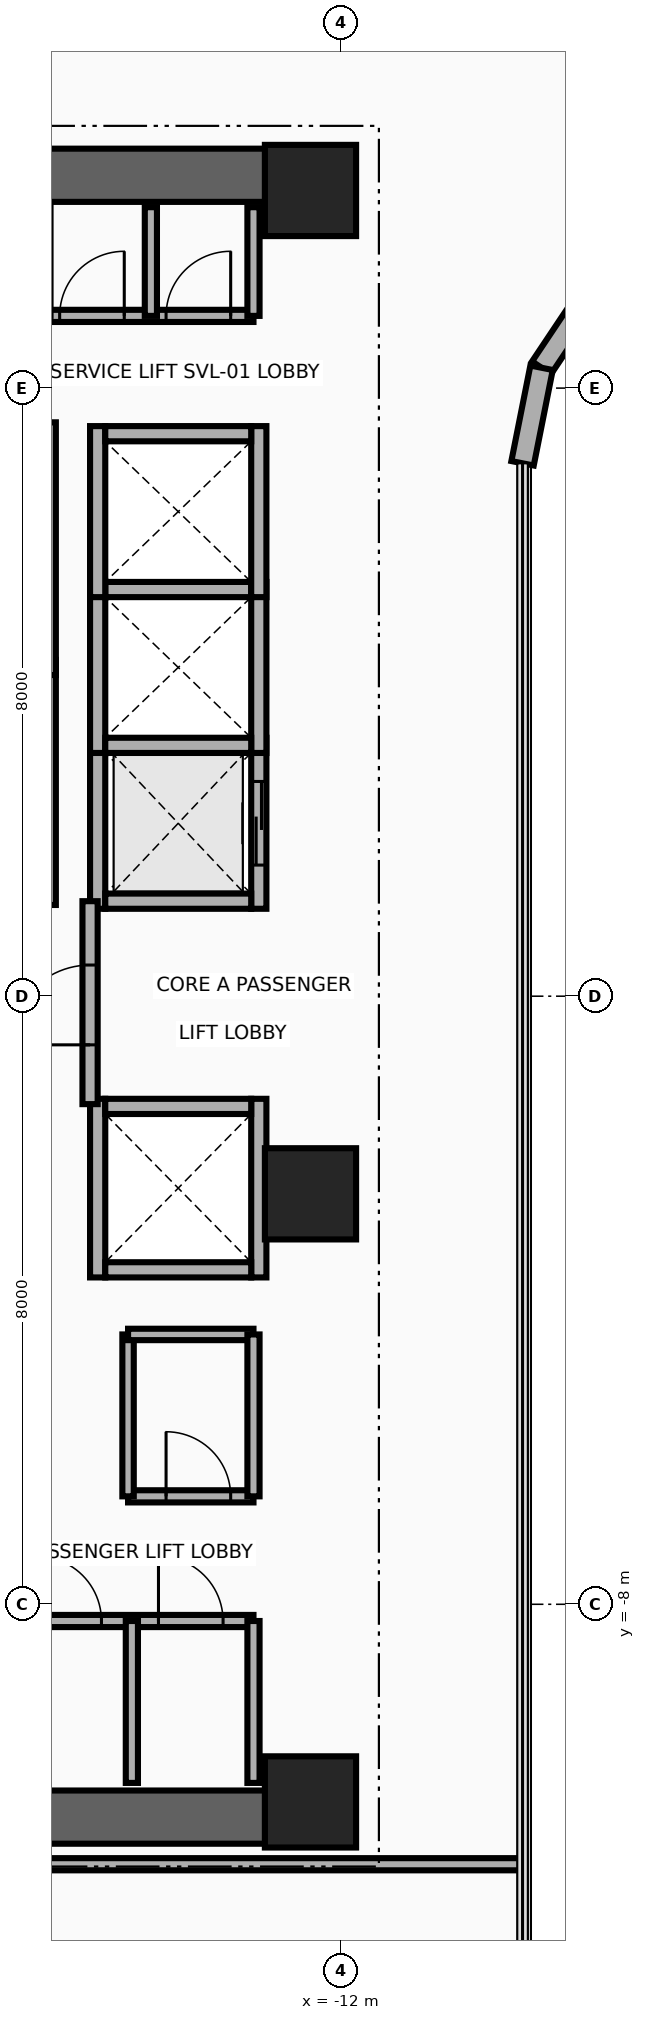
"""IFC4 building model, lengths in metres.
Left out: names, types, materials, properties, quantities, classifications, styles, units other than length and angle.
Written with IfcOpenShell. Run it as: python <this file> out.ifc"""

import sys

from ifc_helpers import new_model, si_unit, direction, frame, frame_2d, origin, origin_2d, place, context, subcontext, project, spatial, rectangle, extrude, source, transform, mapped, element, fill, save


model = new_model("IFC4")
c1 = context("Model", 3, precision=1e-05, world=origin(), true_north=direction((0.0, 1.0)))
c2 = subcontext(c1, "Body", "Model", "MODEL_VIEW")
j1 = project(units=[si_unit("LENGTHUNIT", "METRE"), si_unit("PLANEANGLEUNIT", "RADIAN")], contexts=[c1])
p1 = place(None, origin())
s1 = spatial("IfcSite", under=j1, at=p1, CompositionType="ELEMENT")
p2 = place(p1, origin())
s2 = spatial("IfcBuilding", under=s1, at=p2, CompositionType="ELEMENT")
p3 = place(p2, frame((0.0, 0.0, 139.0)))
s3 = spatial("IfcBuildingStorey", under=s2, at=p3, CompositionType="ELEMENT", Elevation=139.0)
for number, where, z_axis, x_axis in (
    (1, (-22.65, 10.8, 0.0), (0.0, 0.0, 1.0), (1.0, 0.0, 0.0)),
    (2, (-22.65, -10.8, 0.0), (0.0, 0.0, 1.0), (1.0, 0.0, 0.0)),
):
    element("IfcWall", number, at=place(p3, frame(where, z_axis=z_axis, x_axis=x_axis)), inside=s3, PredefinedType="SHEAR", context=c2, shape_type="SweptSolid", body=[
        extrude(rectangle(XDim=10.25, YDim=0.7, at=frame_2d((5.125, 0.0))), origin(), (0.0, 0.0, 1.0), 3.46),
    ])
m1 = source(origin(), c2, "Body", "SweptSolid", [
    extrude(rectangle(XDim=1.2, YDim=1.2, at=origin_2d()), origin(), (0.0, 0.0, 1.0), 3.7),
])
for number, where, z_axis, x_axis in (
    (3, (-12.4, -10.6, 0.0), (0.0, 0.0, 1.0), (1.0, 0.0, 0.0)),
    (4, (-12.4, -2.6, 0.0), (0.0, 0.0, 1.0), (1.0, 0.0, 0.0)),
    (5, (-12.4, 10.6, 0.0), (0.0, 0.0, 1.0), (1.0, 0.0, 0.0)),
):
    element("IfcColumn", number, at=place(p3, frame(where, z_axis=z_axis, x_axis=x_axis)), inside=s3, PredefinedType="COLUMN", context=c2, shape_type="MappedRepresentation", body=[
        mapped(m1, transform((0.0, 0.0, 0.0), x_axis=(1.0, 0.0, 0.0), y_axis=(0.0, 1.0, 0.0), z_axis=(0.0, 0.0, 1.0), scale=1.0)),
    ])
p4 = place(p3, frame((-8.642, 9.342, 0.0), z_axis=(0.0, 0.0, 1.0), x_axis=(-0.555615398575, -0.831439431869, 0.0)))
e6 = element("IfcWall", 6, at=p4, inside=s3, PredefinedType="SOLIDWALL", context=c2, shape_type="SweptSolid", body=[
    extrude(rectangle(XDim=1.292, YDim=0.3, at=frame_2d((0.646, 0.0))), origin(), (0.0, 0.0, 1.0), 3.46),
])
p5 = place(p3, frame((-9.36, 8.268, 0.0), z_axis=(0.0, 0.0, 1.0), x_axis=(-0.195090163074, -0.980785312019, 0.0)))
e7 = element("IfcWall", 7, at=p5, inside=s3, PredefinedType="SOLIDWALL", context=c2, shape_type="SweptSolid", body=[
    extrude(rectangle(XDim=1.281, YDim=0.3, at=frame_2d((0.641, 0.0))), origin(), (0.0, 0.0, 1.0), 3.46),
])
p6 = place(p3, frame((-15.85, 1.2, 0.0), z_axis=(0.0, 0.0, 1.0), x_axis=(0.0, 1.0, 0.0)))
e8 = element("IfcWall", 8, at=p6, inside=s3, PredefinedType="MOVABLE", context=c2, shape_type="SweptSolid", body=[
    extrude(rectangle(XDim=3.225, YDim=0.2, at=frame_2d((1.613, 0.0))), origin(), (0.0, 0.0, 1.0), 3.46),
])
p7 = place(p3, frame((-15.85, 4.225, 0.0), z_axis=(0.0, 0.0, 1.0), x_axis=(0.0, 1.0, 0.0)))
e9 = element("IfcWall", 9, at=p7, inside=s3, PredefinedType="MOVABLE", context=c2, shape_type="SweptSolid", body=[
    extrude(rectangle(XDim=3.325, YDim=0.2, at=frame_2d((1.663, 0.0))), origin(), (0.0, 0.0, 1.0), 3.46),
])
p8 = place(p3, frame((-15.2, 1.15, 0.0), z_axis=(0.0, 0.0, 1.0), x_axis=(0.0, 1.0, 0.0)))
e10 = element("IfcWall", 10, at=p8, inside=s3, PredefinedType="MOVABLE", context=c2, shape_type="SweptSolid", body=[
    extrude(rectangle(XDim=2.25, YDim=0.2, at=frame_2d((1.125, 0.0))), origin(), (0.0, 0.0, 1.0), 3.46),
])
p9 = place(p3, frame((-13.08, 1.15, 0.0), z_axis=(0.0, 0.0, 1.0), x_axis=(0.0, 1.0, 0.0)))
e11 = element("IfcWall", 11, at=p9, inside=s3, PredefinedType="MOVABLE", context=c2, shape_type="SweptSolid", body=[
    extrude(rectangle(XDim=2.25, YDim=0.2, at=frame_2d((1.125, 0.0))), origin(), (0.0, 0.0, 1.0), 3.46),
])
p10 = place(p9, frame((0.575, 0.0, 0.0)))
e12 = element("IfcOpeningElement", 12, at=p10, cuts=e11, PredefinedType="OPENING", context=c2, shape_type="SweptSolid", body=[
    extrude(rectangle(XDim=1.1, YDim=2.1, at=frame_2d((0.55, 1.05))), frame((0.0, 0.115, 0.0), z_axis=(0.0, -1.0, 0.0), x_axis=(1.0, 0.0, 0.0)), (0.0, 0.0, 1.0), 0.23),
])
p11 = place(p3, frame((-15.1, 1.25, 0.0), z_axis=(0.0, 0.0, 1.0), x_axis=(1.0, 0.0, 0.0)))
e13 = element("IfcWall", 13, at=p11, inside=s3, PredefinedType="MOVABLE", context=c2, shape_type="SweptSolid", body=[
    extrude(rectangle(XDim=1.92, YDim=0.2, at=frame_2d((0.96, 0.0))), origin(), (0.0, 0.0, 1.0), 3.46),
])
for number, where, z_axis, x_axis in (
    (14, (-15.2, 3.2, 0.0), (0.0, 0.0, 1.0), (0.0, 1.0, 0.0)),
    (15, (-13.08, 3.2, 0.0), (0.0, 0.0, 1.0), (0.0, 1.0, 0.0)),
):
    element("IfcWall", number, at=place(p3, frame(where, z_axis=z_axis, x_axis=x_axis)), inside=s3, PredefinedType="MOVABLE", context=c2, shape_type="SweptSolid", body=[
        extrude(rectangle(XDim=2.25, YDim=0.2, at=frame_2d((1.125, 0.0))), origin(), (0.0, 0.0, 1.0), 3.46),
    ])
for number, where, z_axis, x_axis in (
    (16, (-15.1, 3.3, 0.0), (0.0, 0.0, 1.0), (1.0, 0.0, 0.0)),
    (17, (-15.1, 5.35, 0.0), (0.0, 0.0, 1.0), (1.0, 0.0, 0.0)),
):
    element("IfcWall", number, at=place(p3, frame(where, z_axis=z_axis, x_axis=x_axis)), inside=s3, PredefinedType="MOVABLE", context=c2, shape_type="SweptSolid", body=[
        extrude(rectangle(XDim=1.92, YDim=0.2, at=frame_2d((0.96, 0.0))), origin(), (0.0, 0.0, 1.0), 3.46),
    ])
for number, where, z_axis, x_axis in (
    (18, (-15.2, 5.25, 0.0), (0.0, 0.0, 1.0), (0.0, 1.0, 0.0)),
    (19, (-13.08, 5.25, 0.0), (0.0, 0.0, 1.0), (0.0, 1.0, 0.0)),
):
    element("IfcWall", number, at=place(p3, frame(where, z_axis=z_axis, x_axis=x_axis)), inside=s3, PredefinedType="MOVABLE", context=c2, shape_type="SweptSolid", body=[
        extrude(rectangle(XDim=2.25, YDim=0.2, at=frame_2d((1.125, 0.0))), origin(), (0.0, 0.0, 1.0), 3.46),
    ])
p12 = place(p3, frame((-15.1, 7.4, 0.0), z_axis=(0.0, 0.0, 1.0), x_axis=(1.0, 0.0, 0.0)))
e20 = element("IfcWall", 20, at=p12, inside=s3, PredefinedType="MOVABLE", context=c2, shape_type="SweptSolid", body=[
    extrude(rectangle(XDim=1.92, YDim=0.2, at=frame_2d((0.96, 0.0))), origin(), (0.0, 0.0, 1.0), 3.46),
])
for number, where, z_axis, x_axis in (
    (21, (-15.2, -3.7, 0.0), (0.0, 0.0, 1.0), (0.0, 1.0, 0.0)),
    (22, (-13.08, -3.7, 0.0), (0.0, 0.0, 1.0), (0.0, 1.0, 0.0)),
):
    element("IfcWall", number, at=place(p3, frame(where, z_axis=z_axis, x_axis=x_axis)), inside=s3, PredefinedType="MOVABLE", context=c2, shape_type="SweptSolid", body=[
        extrude(rectangle(XDim=2.35, YDim=0.2, at=frame_2d((1.175, 0.0))), origin(), (0.0, 0.0, 1.0), 3.46),
    ])
for number, where, z_axis, x_axis in (
    (23, (-15.1, -3.6, 0.0), (0.0, 0.0, 1.0), (1.0, 0.0, 0.0)),
    (24, (-15.1, -1.45, 0.0), (0.0, 0.0, 1.0), (1.0, 0.0, 0.0)),
):
    element("IfcWall", number, at=place(p3, frame(where, z_axis=z_axis, x_axis=x_axis)), inside=s3, PredefinedType="MOVABLE", context=c2, shape_type="SweptSolid", body=[
        extrude(rectangle(XDim=1.92, YDim=0.2, at=frame_2d((0.96, 0.0))), origin(), (0.0, 0.0, 1.0), 3.46),
    ])
p13 = place(p3, frame((-15.3, -1.42, 0.0), z_axis=(0.0, 0.0, 1.0), x_axis=(0.0, 1.0, 0.0)))
e25 = element("IfcWall", 25, at=p13, inside=s3, PredefinedType="PARTITIONING", context=c2, shape_type="SweptSolid", body=[
    extrude(rectangle(XDim=2.67, YDim=0.2, at=frame_2d((1.335, 0.0))), origin(), (0.0, 0.0, 1.0), 3.46),
])
p14 = place(p13, frame((0.78, 0.0, 0.0)))
e26 = element("IfcOpeningElement", 26, at=p14, cuts=e25, PredefinedType="OPENING", context=c2, shape_type="SweptSolid", body=[
    extrude(rectangle(XDim=1.05, YDim=2.15, at=frame_2d((0.525, 1.075))), frame((0.0, 0.115, 0.0), z_axis=(0.0, -1.0, 0.0), x_axis=(1.0, 0.0, 0.0)), (0.0, 0.0, 1.0), 0.23),
])
p15 = place(p3, frame((-18.65, 8.95, 0.0), z_axis=(0.0, 0.0, 1.0), x_axis=(1.0, 0.0, 0.0)))
e27 = element("IfcWall", 27, at=p15, inside=s3, PredefinedType="PARTITIONING", context=c2, shape_type="SweptSolid", body=[
    extrude(rectangle(XDim=5.5, YDim=0.16, at=frame_2d((2.75, 0.0))), origin(), (0.0, 0.0, 1.0), 3.46),
])
p16 = place(p15, frame((0.3, 0.0, 0.0)))
e28 = element("IfcOpeningElement", 28, at=p16, cuts=e27, PredefinedType="OPENING", context=c2, shape_type="SweptSolid", body=[
    extrude(rectangle(XDim=0.85, YDim=2.05, at=frame_2d((0.425, 1.025))), frame((0.0, 0.095, 0.0), z_axis=(0.0, -1.0, 0.0), x_axis=(1.0, 0.0, 0.0)), (0.0, 0.0, 1.0), 0.19),
])
p17 = place(p15, frame((1.55, 0.0, 0.0)))
e29 = element("IfcOpeningElement", 29, at=p17, cuts=e27, PredefinedType="OPENING", context=c2, shape_type="SweptSolid", body=[
    extrude(rectangle(XDim=0.85, YDim=2.05, at=frame_2d((0.425, 1.025))), frame((0.0, 0.095, 0.0), z_axis=(0.0, -1.0, 0.0), x_axis=(1.0, 0.0, 0.0)), (0.0, 0.0, 1.0), 0.19),
])
p18 = place(p15, frame((2.95, 0.0, 0.0)))
e30 = element("IfcOpeningElement", 30, at=p18, cuts=e27, PredefinedType="OPENING", context=c2, shape_type="SweptSolid", body=[
    extrude(rectangle(XDim=0.85, YDim=2.05, at=frame_2d((0.425, 1.025))), frame((0.0, 0.095, 0.0), z_axis=(0.0, -1.0, 0.0), x_axis=(1.0, 0.0, 0.0)), (0.0, 0.0, 1.0), 0.19),
])
p19 = place(p15, frame((4.35, 0.0, 0.0)))
e31 = element("IfcOpeningElement", 31, at=p19, cuts=e27, PredefinedType="OPENING", context=c2, shape_type="SweptSolid", body=[
    extrude(rectangle(XDim=0.85, YDim=2.05, at=frame_2d((0.425, 1.025))), frame((0.0, 0.095, 0.0), z_axis=(0.0, -1.0, 0.0), x_axis=(1.0, 0.0, 0.0)), (0.0, 0.0, 1.0), 0.19),
])
for number, where, z_axis, x_axis in (
    (32, (-13.15, 8.95, 0.0), (0.0, 0.0, 1.0), (0.0, 1.0, 0.0)),
    (33, (-14.5, 8.95, 0.0), (0.0, 0.0, 1.0), (0.0, 1.0, 0.0)),
):
    element("IfcWall", number, at=place(p3, frame(where, z_axis=z_axis, x_axis=x_axis)), inside=s3, PredefinedType="PARTITIONING", context=c2, shape_type="SweptSolid", body=[
        extrude(rectangle(XDim=1.43, YDim=0.16, at=frame_2d((0.715, 0.0))), origin(), (0.0, 0.0, 1.0), 3.46),
    ])
p20 = place(p3, frame((-16.35, -8.22, 0.0), z_axis=(0.0, 0.0, 1.0), x_axis=(1.0, 0.0, 0.0)))
e34 = element("IfcWall", 34, at=p20, inside=s3, PredefinedType="PARTITIONING", context=c2, shape_type="SweptSolid", body=[
    extrude(rectangle(XDim=3.2, YDim=0.16, at=frame_2d((1.6, 0.0))), origin(), (0.0, 0.0, 1.0), 3.46),
])
p21 = place(p20, frame((0.35, 0.0, 0.0)))
e35 = element("IfcOpeningElement", 35, at=p21, cuts=e34, PredefinedType="OPENING", context=c2, shape_type="SweptSolid", body=[
    extrude(rectangle(XDim=0.85, YDim=2.05, at=frame_2d((0.425, 1.025))), frame((0.0, 0.095, 0.0), z_axis=(0.0, -1.0, 0.0), x_axis=(1.0, 0.0, 0.0)), (0.0, 0.0, 1.0), 0.19),
])
p22 = place(p20, frame((1.95, 0.0, 0.0)))
e36 = element("IfcOpeningElement", 36, at=p22, cuts=e34, PredefinedType="OPENING", context=c2, shape_type="SweptSolid", body=[
    extrude(rectangle(XDim=0.85, YDim=2.05, at=frame_2d((0.425, 1.025))), frame((0.0, 0.095, 0.0), z_axis=(0.0, -1.0, 0.0), x_axis=(1.0, 0.0, 0.0)), (0.0, 0.0, 1.0), 0.19),
])
for number, where, z_axis, x_axis in (
    (37, (-13.15, -10.35, 0.0), (0.0, 0.0, 1.0), (0.0, 1.0, 0.0)),
    (38, (-14.75, -10.35, 0.0), (0.0, 0.0, 1.0), (0.0, 1.0, 0.0)),
):
    element("IfcWall", number, at=place(p3, frame(where, z_axis=z_axis, x_axis=x_axis)), inside=s3, PredefinedType="PARTITIONING", context=c2, shape_type="SweptSolid", body=[
        extrude(rectangle(XDim=2.13, YDim=0.16, at=frame_2d((1.065, 0.0))), origin(), (0.0, 0.0, 1.0), 3.46),
    ])
p23 = place(p3, frame((-14.8, -6.58, 0.0), z_axis=(0.0, 0.0, 1.0), x_axis=(1.0, 0.0, 0.0)))
e39 = element("IfcWall", 39, at=p23, inside=s3, PredefinedType="PARTITIONING", context=c2, shape_type="SweptSolid", body=[
    extrude(rectangle(XDim=1.65, YDim=0.16, at=frame_2d((0.825, 0.0))), origin(), (0.0, 0.0, 1.0), 3.46),
])
p24 = place(p23, frame((0.5, 0.0, 0.0)))
e40 = element("IfcOpeningElement", 40, at=p24, cuts=e39, PredefinedType="OPENING", context=c2, shape_type="SweptSolid", body=[
    extrude(rectangle(XDim=0.85, YDim=2.05, at=frame_2d((0.425, 1.025))), frame((0.0, 0.095, 0.0), z_axis=(0.0, -1.0, 0.0), x_axis=(1.0, 0.0, 0.0)), (0.0, 0.0, 1.0), 0.19),
])
p25 = place(p3, frame((-14.8, -6.58, 0.0), z_axis=(0.0, 0.0, 1.0), x_axis=(0.0, 1.0, 0.0)))
e41 = element("IfcWall", 41, at=p25, inside=s3, PredefinedType="PARTITIONING", context=c2, shape_type="SweptSolid", body=[
    extrude(rectangle(XDim=2.13, YDim=0.15, at=frame_2d((1.065, 0.0))), origin(), (0.0, 0.0, 1.0), 3.46),
])
p26 = place(p3, frame((-14.8, -4.45, 0.0), z_axis=(0.0, 0.0, 1.0), x_axis=(1.0, 0.0, 0.0)))
e42 = element("IfcWall", 42, at=p26, inside=s3, PredefinedType="PARTITIONING", context=c2, shape_type="SweptSolid", body=[
    extrude(rectangle(XDim=1.65, YDim=0.15, at=frame_2d((0.825, 0.0))), origin(), (0.0, 0.0, 1.0), 3.46),
])
p27 = place(p3, frame((-13.15, -6.58, 0.0), z_axis=(0.0, 0.0, 1.0), x_axis=(0.0, 1.0, 0.0)))
e43 = element("IfcWall", 43, at=p27, inside=s3, PredefinedType="PARTITIONING", context=c2, shape_type="SweptSolid", body=[
    extrude(rectangle(XDim=2.13, YDim=0.16, at=frame_2d((1.065, 0.0))), origin(), (0.0, 0.0, 1.0), 3.46),
])
p28 = place(p3, frame((-23.45, -11.42, 0.0), z_axis=(0.0, 0.0, 1.0), x_axis=(1.0, 0.0, 0.0)))
e44 = element("IfcWall", 44, at=p28, inside=s3, PredefinedType="PARTITIONING", context=c2, shape_type="SweptSolid", body=[
    extrude(rectangle(XDim=13.84, YDim=0.16, at=frame_2d((6.92, 0.0))), origin(), (0.0, 0.0, 1.0), 2.834),
])
p29 = place(p10, origin())
e45 = element("IfcDoor", 45, at=p29, inside=s3, OperationType="DOUBLE_DOOR_SLIDING", PredefinedType="DOOR", context=c2, shape_type="SweptSolid", body=[
    extrude(rectangle(XDim=1.1, YDim=2.1, at=frame_2d((0.55, 1.05))), frame((0.0, 0.025, 0.0), z_axis=(0.0, -1.0, 0.0), x_axis=(1.0, 0.0, 0.0)), (0.0, 0.0, 1.0), 0.05),
])
fill(e12, e45)
p30 = place(p14, origin())
e46 = element("IfcDoor", 46, at=p30, inside=s3, OperationType="SINGLE_SWING_RIGHT", PredefinedType="DOOR", context=c2, shape_type="SweptSolid", body=[
    extrude(rectangle(XDim=1.05, YDim=2.15, at=frame_2d((0.525, 1.075))), frame((0.0, 0.025, 0.0), z_axis=(0.0, -1.0, 0.0), x_axis=(1.0, 0.0, 0.0)), (0.0, 0.0, 1.0), 0.05),
])
fill(e26, e46)
p31 = place(p18, origin())
e47 = element("IfcDoor", 47, at=p31, inside=s3, OperationType="SINGLE_SWING_LEFT", PredefinedType="DOOR", context=c2, shape_type="SweptSolid", body=[
    extrude(rectangle(XDim=0.85, YDim=2.05, at=frame_2d((0.425, 1.025))), frame((0.0, 0.025, 0.0), z_axis=(0.0, -1.0, 0.0), x_axis=(1.0, 0.0, 0.0)), (0.0, 0.0, 1.0), 0.05),
])
fill(e30, e47)
p32 = place(p19, origin())
e48 = element("IfcDoor", 48, at=p32, inside=s3, OperationType="SINGLE_SWING_RIGHT", PredefinedType="DOOR", context=c2, shape_type="SweptSolid", body=[
    extrude(rectangle(XDim=0.85, YDim=2.05, at=frame_2d((0.425, 1.025))), frame((0.0, 0.025, 0.0), z_axis=(0.0, -1.0, 0.0), x_axis=(1.0, 0.0, 0.0)), (0.0, 0.0, 1.0), 0.05),
])
fill(e31, e48)
p33 = place(p21, origin())
e49 = element("IfcDoor", 49, at=p33, inside=s3, OperationType="SINGLE_SWING_LEFT", PredefinedType="DOOR", context=c2, shape_type="SweptSolid", body=[
    extrude(rectangle(XDim=0.85, YDim=2.05, at=frame_2d((0.425, 1.025))), frame((0.0, 0.025, 0.0), z_axis=(0.0, -1.0, 0.0), x_axis=(1.0, 0.0, 0.0)), (0.0, 0.0, 1.0), 0.05),
])
fill(e35, e49)
p34 = place(p22, origin())
e50 = element("IfcDoor", 50, at=p34, inside=s3, OperationType="SINGLE_SWING_RIGHT", PredefinedType="DOOR", context=c2, shape_type="SweptSolid", body=[
    extrude(rectangle(XDim=0.85, YDim=2.05, at=frame_2d((0.425, 1.025))), frame((0.0, 0.025, 0.0), z_axis=(0.0, -1.0, 0.0), x_axis=(1.0, 0.0, 0.0)), (0.0, 0.0, 1.0), 0.05),
])
fill(e36, e50)
p35 = place(p24, origin())
e51 = element("IfcDoor", 51, at=p35, inside=s3, OperationType="SINGLE_SWING_LEFT", PredefinedType="DOOR", context=c2, shape_type="SweptSolid", body=[
    extrude(rectangle(XDim=0.85, YDim=2.05, at=frame_2d((0.425, 1.025))), frame((0.0, 0.025, 0.0), z_axis=(0.0, -1.0, 0.0), x_axis=(1.0, 0.0, 0.0)), (0.0, 0.0, 1.0), 0.05),
])
fill(e40, e51)
save(model, sys.argv[1])
